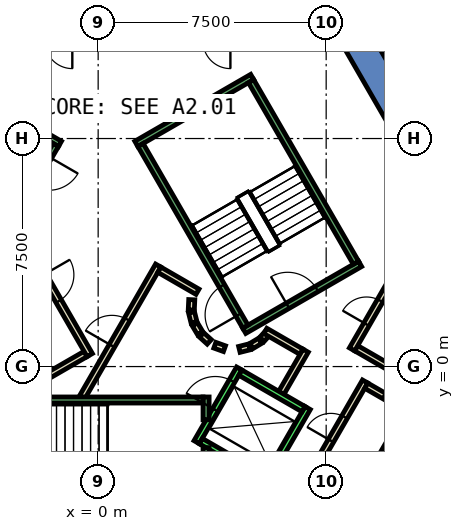
"""IFC4 building model, lengths in metres.
Left out: names, types, materials, properties, quantities, classifications, styles, units other than length and angle.
Written with IfcOpenShell. Run it as: python <this file> out.ifc"""

import sys

from ifc_helpers import new_model, si_unit, direction, frame, frame_2d, origin, place, context, subcontext, project, spatial, polyline, rectangle, outline, extrude, element, fill, save


model = new_model("IFC4")
c1 = context("Model", 3, precision=1e-05, world=origin(), true_north=direction((0.0, 1.0)))
c2 = subcontext(c1, "Body", "Model", "MODEL_VIEW")
j1 = project(units=[si_unit("LENGTHUNIT", "METRE"), si_unit("PLANEANGLEUNIT", "RADIAN")], contexts=[c1])
p1 = place(None, origin())
s1 = spatial("IfcSite", under=j1, at=p1, CompositionType="ELEMENT")
p2 = place(p1, origin())
s2 = spatial("IfcBuilding", under=s1, at=p2, CompositionType="ELEMENT")
p3 = place(p2, frame((0.0, 0.0, -16.5)))
s3 = spatial("IfcBuildingStorey", under=s2, at=p3, CompositionType="ELEMENT", Elevation=-16.5)
p4 = place(p3, origin())
e1 = element("IfcWall", 1, at=p4, inside=s3, PredefinedType="SHEAR", context=c2, shape_type="SweptSolid", body=[
    extrude(outline(polyline([(8.517, 11.748), (7.651, 11.248), (12.702, 2.5), (13.856, 2.5), (8.517, 11.748)])), origin(), (0.0, 0.0, 1.0), 5.08),
])
p5 = place(p3, origin())
e2 = element("IfcWall", 2, at=p5, inside=s3, PredefinedType="SHEAR", context=c2, shape_type="SweptSolid", body=[
    extrude(outline(polyline([(6.928, -9.5), (13.856, 2.5), (12.702, 2.5), (6.351, -8.5), (6.928, -9.5)])), origin(), (0.0, 0.0, 1.0), 5.08),
])
p6 = place(p3, frame((6.981, -3.609, 0.0), z_axis=(0.0, 0.0, 1.0), x_axis=(0.499982693035, 0.866035395735, 0.0)))
e3 = element("IfcWall", 3, at=p6, inside=s3, PredefinedType="PARTITIONING", context=c2, shape_type="SweptSolid", body=[
    extrude(rectangle(XDim=3.6, YDim=0.2, at=frame_2d((1.8, 0.0))), origin(), (0.0, 0.0, 1.0), 5.08),
])
p7 = place(p6, frame((1.35, 0.0, 0.0)))
e4 = element("IfcOpeningElement", 4, at=p7, cuts=e3, PredefinedType="OPENING", context=c2, shape_type="SweptSolid", body=[
    extrude(rectangle(XDim=0.9, YDim=2.1, at=frame_2d((0.45, 1.05))), frame((0.0, 0.11, 0.0), z_axis=(0.0, -1.0, 0.0), x_axis=(1.0, 0.0, 0.0)), (0.0, 0.0, 1.0), 0.22),
])
p8 = place(p3, frame((8.817, -0.628, 0.0), z_axis=(0.0, 0.0, 1.0), x_axis=(0.866307342011, -0.4995113504, 0.0)))
e5 = element("IfcWall", 5, at=p8, inside=s3, PredefinedType="PARTITIONING", context=c2, shape_type="SweptSolid", body=[
    extrude(rectangle(XDim=0.701, YDim=0.2, at=frame_2d((0.351, 0.0))), origin(), (0.0, 0.0, 1.0), 5.08),
])
p9 = place(p3, frame((10.703, -0.562, 0.0), z_axis=(0.0, 0.0, 1.0), x_axis=(-0.500012382935, -0.866018254376, 0.0)))
e6 = element("IfcWall", 6, at=p9, inside=s3, PredefinedType="PARTITIONING", context=c2, shape_type="SweptSolid", body=[
    extrude(rectangle(XDim=5.199, YDim=0.2, at=frame_2d((2.6, 0.0))), origin(), (0.0, 0.0, 1.0), 5.08),
])
p10 = place(p3, frame((10.653, -0.648, 0.0), z_axis=(0.0, 0.0, 1.0), x_axis=(-0.866022959057, 0.500004234368, 0.0)))
e7 = element("IfcWall", 7, at=p10, inside=s3, PredefinedType="PARTITIONING", context=c2, shape_type="SweptSolid", body=[
    extrude(rectangle(XDim=2.5, YDim=0.2, at=frame_2d((1.25, 0.0))), origin(), (0.0, 0.0, 1.0), 5.08),
])
p11 = place(p3, frame((8.351, 0.565, 0.0), z_axis=(0.0, 0.0, 1.0), x_axis=(0.49989585183, 0.866085525409, 0.0)))
e8 = element("IfcWall", 8, at=p11, inside=s3, PredefinedType="PARTITIONING", context=c2, shape_type="SweptSolid", body=[
    extrude(rectangle(XDim=2.6, YDim=0.2, at=frame_2d((1.3, 0.0))), origin(), (0.0, 0.0, 1.0), 5.08),
])
p12 = place(p11, frame((0.95, 0.0, 0.0)))
e9 = element("IfcOpeningElement", 9, at=p12, cuts=e8, PredefinedType="OPENING", context=c2, shape_type="SweptSolid", body=[
    extrude(rectangle(XDim=0.9, YDim=2.1, at=frame_2d((0.45, 1.05))), frame((0.0, 0.11, 0.0), z_axis=(0.0, -1.0, 0.0), x_axis=(1.0, 0.0, 0.0)), (0.0, 0.0, 1.0), 0.22),
])
p13 = place(p3, frame((3.079, 2.199, 0.0), z_axis=(0.0, 0.0, 1.0), x_axis=(-0.047771483479, -0.998858290933, 0.0)))
e10 = element("IfcWall", 10, at=p13, inside=s3, PredefinedType="PARTITIONING", context=c2, shape_type="SweptSolid", body=[
    extrude(rectangle(XDim=0.337, YDim=0.2, at=frame_2d((0.169, 0.0))), origin(), (0.0, 0.0, 1.0), 5.08),
])
p14 = place(p3, frame((3.07, 1.786, 0.0), z_axis=(0.0, 0.0, 1.0), x_axis=(0.242705583207, -0.970099994784, 0.0)))
e11 = element("IfcWall", 11, at=p14, inside=s3, PredefinedType="PARTITIONING", context=c2, shape_type="SweptSolid", body=[
    extrude(rectangle(XDim=0.338, YDim=0.2, at=frame_2d((0.169, 0.0))), origin(), (0.0, 0.0, 1.0), 5.08),
])
for number, where, z_axis, x_axis in (
    (12, (3.182, 1.388, 0.0), (0.0, 0.0, 1.0), (0.512, -0.859, 0.0)),
    (13, (3.404, 1.039, 0.0), (0.0, 0.0, 1.0), (0.74, -0.672, 0.0)),
):
    element("IfcWall", number, at=place(p3, frame(where, z_axis=z_axis, x_axis=x_axis)), inside=s3, PredefinedType="PARTITIONING", context=c2, shape_type="SweptSolid", body=[
        extrude(rectangle(XDim=0.338, YDim=0.2, at=frame_2d((0.169, 0.0))), origin(), (0.0, 0.0, 1.0), 5.08),
    ])
p15 = place(p3, frame((3.838, 0.702, 0.0), z_axis=(0.0, 0.0, 1.0), x_axis=(0.941035081519, -0.338308993895, 0.0)))
e14 = element("IfcWall", 14, at=p15, inside=s3, PredefinedType="PARTITIONING", context=c2, shape_type="SweptSolid", body=[
    extrude(rectangle(XDim=0.337, YDim=0.2, at=frame_2d((0.168, 0.0))), origin(), (0.0, 0.0, 1.0), 5.08),
])
p16 = place(p3, frame((4.644, 0.564, 0.0), z_axis=(0.0, 0.0, 1.0), x_axis=(0.969929076366, 0.243387729394, 0.0)))
e15 = element("IfcWall", 15, at=p16, inside=s3, PredefinedType="PARTITIONING", context=c2, shape_type="SweptSolid", body=[
    extrude(rectangle(XDim=0.337, YDim=0.2, at=frame_2d((0.168, 0.0))), origin(), (0.0, 0.0, 1.0), 5.08),
])
p17 = place(p3, frame((5.042, 0.676, 0.0), z_axis=(0.0, 0.0, 1.0), x_axis=(0.857940155512, 0.513749637042, 0.0)))
e16 = element("IfcWall", 16, at=p17, inside=s3, PredefinedType="PARTITIONING", context=c2, shape_type="SweptSolid", body=[
    extrude(rectangle(XDim=0.337, YDim=0.2, at=frame_2d((0.168, 0.0))), origin(), (0.0, 0.0, 1.0), 5.08),
])
p18 = place(p3, frame((5.39, 0.898, 0.0), z_axis=(0.0, 0.0, 1.0), x_axis=(0.673828488714, 0.738887791073, 0.0)))
e17 = element("IfcWall", 17, at=p18, inside=s3, PredefinedType="PARTITIONING", context=c2, shape_type="SweptSolid", body=[
    extrude(rectangle(XDim=0.263, YDim=0.2, at=frame_2d((0.131, 0.0))), origin(), (0.0, 0.0, 1.0), 5.08),
])
p19 = place(p3, frame((5.499, 1.172, 0.0), z_axis=(0.0, 0.0, 1.0), x_axis=(0.866333505267, -0.499465972466, 0.0)))
e18 = element("IfcWall", 18, at=p19, inside=s3, PredefinedType="PARTITIONING", context=c2, shape_type="SweptSolid", body=[
    extrude(rectangle(XDim=1.374, YDim=0.2, at=frame_2d((0.687, 0.0))), origin(), (0.0, 0.0, 1.0), 5.08),
])
p20 = place(p3, frame((6.826, 0.522, 0.0), z_axis=(0.0, 0.0, 1.0), x_axis=(-0.500016722714, -0.866015748706, 0.0)))
e19 = element("IfcWall", 19, at=p20, inside=s3, PredefinedType="PARTITIONING", context=c2, shape_type="SweptSolid", body=[
    extrude(rectangle(XDim=1.7, YDim=0.2, at=frame_2d((0.85, 0.0))), origin(), (0.0, 0.0, 1.0), 5.08),
])
p21 = place(p3, frame((-0.52, -1.0, 0.0), z_axis=(0.0, 0.0, 1.0), x_axis=(0.50011622646, 0.865958290007, 0.0)))
e20 = element("IfcWall", 20, at=p21, inside=s3, PredefinedType="PARTITIONING", context=c2, shape_type="SweptSolid", body=[
    extrude(rectangle(XDim=4.991, YDim=0.2, at=frame_2d((2.496, 0.0))), origin(), (0.0, 0.0, 1.0), 5.08),
])
p22 = place(p21, frame((1.945, 0.0, 0.0)))
e21 = element("IfcOpeningElement", 21, at=p22, cuts=e20, PredefinedType="OPENING", context=c2, shape_type="SweptSolid", body=[
    extrude(rectangle(XDim=1.0, YDim=2.1, at=frame_2d((0.5, 1.05))), frame((0.0, 0.11, 0.0), z_axis=(0.0, -1.0, 0.0), x_axis=(1.0, 0.0, 0.0)), (0.0, 0.0, 1.0), 0.22),
])
p23 = place(p3, frame((2.012, 3.186, 0.0), z_axis=(0.0, 0.0, 1.0), x_axis=(0.865891012941, -0.500232699559, 0.0)))
e22 = element("IfcWall", 22, at=p23, inside=s3, PredefinedType="PARTITIONING", context=c2, shape_type="SweptSolid", body=[
    extrude(rectangle(XDim=1.449, YDim=0.2, at=frame_2d((0.725, 0.0))), origin(), (0.0, 0.0, 1.0), 5.08),
])
p24 = place(p3, frame((-0.412, 0.414, 0.0), z_axis=(0.0, 0.0, 1.0), x_axis=(-0.866017369001, -0.500013916395, 0.0)))
e23 = element("IfcWall", 23, at=p24, inside=s3, PredefinedType="PARTITIONING", context=c2, shape_type="SweptSolid", body=[
    extrude(rectangle(XDim=1.45, YDim=0.2, at=frame_2d((0.725, 0.0))), origin(), (0.0, 0.0, 1.0), 5.08),
])
p25 = place(p3, frame((-2.771, 4.7, 0.0), z_axis=(0.0, 0.0, 1.0), x_axis=(0.499969479948, -0.866043023828, 0.0)))
e24 = element("IfcWall", 24, at=p25, inside=s3, PredefinedType="PARTITIONING", context=c2, shape_type="SweptSolid", body=[
    extrude(rectangle(XDim=4.99, YDim=0.2, at=frame_2d((2.495, 0.0))), origin(), (0.0, 0.0, 1.0), 5.08),
])
p26 = place(p25, frame((1.945, 0.0, 0.0)))
e25 = element("IfcOpeningElement", 25, at=p26, cuts=e24, PredefinedType="OPENING", context=c2, shape_type="SweptSolid", body=[
    extrude(rectangle(XDim=1.0, YDim=2.1, at=frame_2d((0.5, 1.05))), frame((0.0, 0.11, 0.0), z_axis=(0.0, -1.0, 0.0), x_axis=(1.0, 0.0, 0.0)), (0.0, 0.0, 1.0), 0.22),
])
p27 = place(p3, frame((3.24, -2.488, 0.0), z_axis=(0.0, 0.0, 1.0), x_axis=(0.49994636267, 0.866056369097, 0.0)))
e26 = element("IfcWall", 26, at=p27, inside=s3, PredefinedType="STANDARD", context=c2, shape_type="SweptSolid", body=[
    extrude(rectangle(XDim=2.8, YDim=0.2, at=frame_2d((1.4, 0.0))), origin(), (0.0, 0.0, 1.0), 5.08),
])
p28 = place(p27, frame((1.225, 0.0, 0.0)))
e27 = element("IfcOpeningElement", 27, at=p28, cuts=e26, PredefinedType="OPENING", context=c2, shape_type="SweptSolid", body=[
    extrude(rectangle(XDim=1.1, YDim=2.1, at=frame_2d((0.55, 1.05))), frame((0.0, 0.11, 0.0), z_axis=(0.0, -1.0, 0.0), x_axis=(1.0, 0.0, 0.0)), (0.0, 0.0, 1.0), 0.22),
])
p29 = place(p3, frame((5.492, -3.788, 0.0), z_axis=(0.0, 0.0, 1.0), x_axis=(0.500011755427, 0.866018616679, 0.0)))
e28 = element("IfcWall", 28, at=p29, inside=s3, PredefinedType="STANDARD", context=c2, shape_type="SweptSolid", body=[
    extrude(rectangle(XDim=2.8, YDim=0.2, at=frame_2d((1.4, 0.0))), origin(), (0.0, 0.0, 1.0), 5.08),
])
p30 = place(p3, frame((3.377, -2.452, 0.0), z_axis=(0.0, 0.0, 1.0), x_axis=(0.865955154139, -0.50012165622, 0.0)))
e29 = element("IfcWall", 29, at=p30, inside=s3, PredefinedType="STANDARD", context=c2, shape_type="SweptSolid", body=[
    extrude(rectangle(XDim=2.4, YDim=0.2, at=frame_2d((1.2, 0.0))), origin(), (0.0, 0.0, 1.0), 5.08),
])
p31 = place(p3, frame((4.677, -0.2, 0.0), z_axis=(0.0, 0.0, 1.0), x_axis=(0.865973769406, -0.500089422704, 0.0)))
e30 = element("IfcWall", 30, at=p31, inside=s3, PredefinedType="STANDARD", context=c2, shape_type="SweptSolid", body=[
    extrude(rectangle(XDim=2.399, YDim=0.2, at=frame_2d((1.2, 0.0))), origin(), (0.0, 0.0, 1.0), 5.08),
])
p32 = place(p3, frame((3.55, -2.667, 0.0), z_axis=(0.0, 0.0, 1.0), x_axis=(0.0, -1.0, 0.0)))
e31 = element("IfcWall", 31, at=p32, inside=s3, PredefinedType="STANDARD", context=c2, shape_type="SweptSolid", body=[
    extrude(rectangle(XDim=2.733, YDim=0.2, at=frame_2d((1.366, 0.0))), origin(), (0.0, 0.0, 1.0), 5.08),
])
p33 = place(p3, frame((3.55, -1.0, 0.0), z_axis=(0.0, 0.0, 1.0), x_axis=(0.0, -1.0, 0.0)))
e32 = element("IfcWall", 32, at=p33, inside=s3, PredefinedType="STANDARD", context=c2, shape_type="SweptSolid", body=[
    extrude(rectangle(XDim=0.751, YDim=0.2, at=frame_2d((0.375, 0.0))), origin(), (0.0, 0.0, 1.0), 5.08),
])
p34 = place(p3, frame((-3.45, -1.1, 0.0), z_axis=(0.0, 0.0, 1.0), x_axis=(1.0, 0.0, 0.0)))
e33 = element("IfcWall", 33, at=p34, inside=s3, PredefinedType="STANDARD", context=c2, shape_type="SweptSolid", body=[
    extrude(rectangle(XDim=6.9, YDim=0.2, at=frame_2d((3.45, 0.0))), origin(), (0.0, 0.0, 1.0), 5.08),
])
p35 = place(p34, frame((0.45, 0.0, 0.0)))
e34 = element("IfcOpeningElement", 34, at=p35, cuts=e33, PredefinedType="OPENING", context=c2, shape_type="SweptSolid", body=[
    extrude(rectangle(XDim=1.1, YDim=2.2, at=frame_2d((0.55, 1.1))), frame((0.0, 0.11, 0.0), z_axis=(0.0, -1.0, 0.0), x_axis=(1.0, 0.0, 0.0)), (0.0, 0.0, 1.0), 0.22),
])
p36 = place(p3, frame((4.806, 1.176, 0.0), z_axis=(0.0, 0.0, 1.0), x_axis=(0.866059941101, 0.499940174841, 0.0)))
e35 = element("IfcWall", 35, at=p36, inside=s3, PredefinedType="STANDARD", context=c2, shape_type="SweptSolid", body=[
    extrude(rectangle(XDim=4.4, YDim=0.2, at=frame_2d((2.2, 0.0))), origin(), (0.0, 0.0, 1.0), 5.08),
])
p37 = place(p36, frame((1.65, 0.0, 0.0)))
e36 = element("IfcOpeningElement", 36, at=p37, cuts=e35, PredefinedType="OPENING", context=c2, shape_type="SweptSolid", body=[
    extrude(rectangle(XDim=1.1, YDim=2.2, at=frame_2d((0.55, 1.1))), frame((0.0, 0.11, 0.0), z_axis=(0.0, -1.0, 0.0), x_axis=(1.0, 0.0, 0.0)), (0.0, 0.0, 1.0), 0.22),
])
p38 = place(p3, frame((1.256, 7.324, 0.0), z_axis=(0.0, 0.0, 1.0), x_axis=(0.866046073146, 0.499964197906, 0.0)))
e37 = element("IfcWall", 37, at=p38, inside=s3, PredefinedType="STANDARD", context=c2, shape_type="SweptSolid", body=[
    extrude(rectangle(XDim=4.4, YDim=0.2, at=frame_2d((2.2, 0.0))), origin(), (0.0, 0.0, 1.0), 5.08),
])
p39 = place(p3, frame((4.843, 1.312, 0.0), z_axis=(0.0, 0.0, 1.0), x_axis=(-0.499963383562, 0.866046543262, 0.0)))
e38 = element("IfcWall", 38, at=p39, inside=s3, PredefinedType="STANDARD", context=c2, shape_type="SweptSolid", body=[
    extrude(rectangle(XDim=6.9, YDim=0.2, at=frame_2d((3.45, 0.0))), origin(), (0.0, 0.0, 1.0), 5.08),
])
p40 = place(p39, frame((0.45, 0.0, 0.0)))
e39 = element("IfcOpeningElement", 39, at=p40, cuts=e38, PredefinedType="OPENING", context=c2, shape_type="SweptSolid", body=[
    extrude(rectangle(XDim=1.1, YDim=2.2, at=frame_2d((0.55, 1.1))), frame((0.0, 0.11, 0.0), z_axis=(0.0, -1.0, 0.0), x_axis=(1.0, 0.0, 0.0)), (0.0, 0.0, 1.0), 0.22),
])
p41 = place(p3, frame((8.48, 3.412, 0.0), z_axis=(0.0, 0.0, 1.0), x_axis=(-0.499978703459, 0.866037698999, 0.0)))
e40 = element("IfcWall", 40, at=p41, inside=s3, PredefinedType="STANDARD", context=c2, shape_type="SweptSolid", body=[
    extrude(rectangle(XDim=6.9, YDim=0.2, at=frame_2d((3.45, 0.0))), origin(), (0.0, 0.0, 1.0), 5.08),
])
p42 = place(p3, frame((-1.256, 7.324, 0.0), z_axis=(0.0, 0.0, 1.0), x_axis=(-0.866046073146, 0.499964197906, 0.0)))
e41 = element("IfcWall", 41, at=p42, inside=s3, PredefinedType="STANDARD", context=c2, shape_type="SweptSolid", body=[
    extrude(rectangle(XDim=4.4, YDim=0.2, at=frame_2d((2.2, 0.0))), origin(), (0.0, 0.0, 1.0), 5.08),
])
p43 = place(p42, frame((1.65, 0.0, 0.0)))
e42 = element("IfcOpeningElement", 42, at=p43, cuts=e41, PredefinedType="OPENING", context=c2, shape_type="SweptSolid", body=[
    extrude(rectangle(XDim=1.1, YDim=2.2, at=frame_2d((0.55, 1.1))), frame((0.0, 0.11, 0.0), z_axis=(0.0, -1.0, 0.0), x_axis=(1.0, 0.0, 0.0)), (0.0, 0.0, 1.0), 0.22),
])
p44 = place(p3, frame((-1.393, 7.288, 0.0), z_axis=(0.0, 0.0, 1.0), x_axis=(-0.499963383562, -0.866046543262, 0.0)))
e43 = element("IfcWall", 43, at=p44, inside=s3, PredefinedType="STANDARD", context=c2, shape_type="SweptSolid", body=[
    extrude(rectangle(XDim=6.9, YDim=0.2, at=frame_2d((3.45, 0.0))), origin(), (0.0, 0.0, 1.0), 5.08),
])
p45 = place(p44, frame((0.45, 0.0, 0.0)))
e44 = element("IfcOpeningElement", 44, at=p45, cuts=e43, PredefinedType="OPENING", context=c2, shape_type="SweptSolid", body=[
    extrude(rectangle(XDim=1.1, YDim=2.2, at=frame_2d((0.55, 1.1))), frame((0.0, 0.11, 0.0), z_axis=(0.0, -1.0, 0.0), x_axis=(1.0, 0.0, 0.0)), (0.0, 0.0, 1.0), 0.22),
])
p46 = place(p22, origin())
e45 = element("IfcDoor", 45, at=p46, inside=s3, OperationType="SINGLE_SWING_LEFT", PredefinedType="DOOR", context=c2, shape_type="SweptSolid", body=[
    extrude(rectangle(XDim=1.0, YDim=2.1, at=frame_2d((0.5, 1.05))), frame((0.0, 0.025, 0.0), z_axis=(0.0, -1.0, 0.0), x_axis=(1.0, 0.0, 0.0)), (0.0, 0.0, 1.0), 0.05),
])
fill(e21, e45)
p47 = place(p26, origin())
e46 = element("IfcDoor", 46, at=p47, inside=s3, OperationType="SINGLE_SWING_RIGHT", PredefinedType="DOOR", context=c2, shape_type="SweptSolid", body=[
    extrude(rectangle(XDim=1.0, YDim=2.1, at=frame_2d((0.5, 1.05))), frame((0.0, 0.025, 0.0), z_axis=(0.0, -1.0, 0.0), x_axis=(1.0, 0.0, 0.0)), (0.0, 0.0, 1.0), 0.05),
])
fill(e25, e46)
p48 = place(p7, origin())
e47 = element("IfcDoor", 47, at=p48, inside=s3, OperationType="SINGLE_SWING_RIGHT", PredefinedType="DOOR", context=c2, shape_type="SweptSolid", body=[
    extrude(rectangle(XDim=0.9, YDim=2.1, at=frame_2d((0.45, 1.05))), frame((0.0, 0.025, 0.0), z_axis=(0.0, -1.0, 0.0), x_axis=(1.0, 0.0, 0.0)), (0.0, 0.0, 1.0), 0.05),
])
fill(e4, e47)
p49 = place(p12, origin())
e48 = element("IfcDoor", 48, at=p49, inside=s3, OperationType="SINGLE_SWING_LEFT", PredefinedType="DOOR", context=c2, shape_type="SweptSolid", body=[
    extrude(rectangle(XDim=0.9, YDim=2.1, at=frame_2d((0.45, 1.05))), frame((0.0, 0.025, 0.0), z_axis=(0.0, -1.0, 0.0), x_axis=(1.0, 0.0, 0.0)), (0.0, 0.0, 1.0), 0.05),
])
fill(e9, e48)
p50 = place(p28, origin())
e49 = element("IfcDoor", 49, at=p50, inside=s3, OperationType="SLIDING_TO_LEFT", PredefinedType="DOOR", context=c2, shape_type="SweptSolid", body=[
    extrude(rectangle(XDim=1.1, YDim=2.1, at=frame_2d((0.55, 1.05))), frame((0.0, 0.025, 0.0), z_axis=(0.0, -1.0, 0.0), x_axis=(1.0, 0.0, 0.0)), (0.0, 0.0, 1.0), 0.05),
])
fill(e27, e49)
p51 = place(p40, origin())
e50 = element("IfcDoor", 50, at=p51, inside=s3, OperationType="SINGLE_SWING_LEFT", PredefinedType="DOOR", context=c2, shape_type="SweptSolid", body=[
    extrude(rectangle(XDim=1.1, YDim=2.2, at=frame_2d((0.55, 1.1))), frame((0.0, 0.025, 0.0), z_axis=(0.0, -1.0, 0.0), x_axis=(1.0, 0.0, 0.0)), (0.0, 0.0, 1.0), 0.05),
])
fill(e39, e50)
p52 = place(p37, origin())
e51 = element("IfcDoor", 51, at=p52, inside=s3, OperationType="SINGLE_SWING_LEFT", PredefinedType="DOOR", context=c2, shape_type="SweptSolid", body=[
    extrude(rectangle(XDim=1.1, YDim=2.2, at=frame_2d((0.55, 1.1))), frame((0.0, 0.025, 0.0), z_axis=(0.0, -1.0, 0.0), x_axis=(1.0, 0.0, 0.0)), (0.0, 0.0, 1.0), 0.05),
])
fill(e36, e51)
save(model, sys.argv[1])
